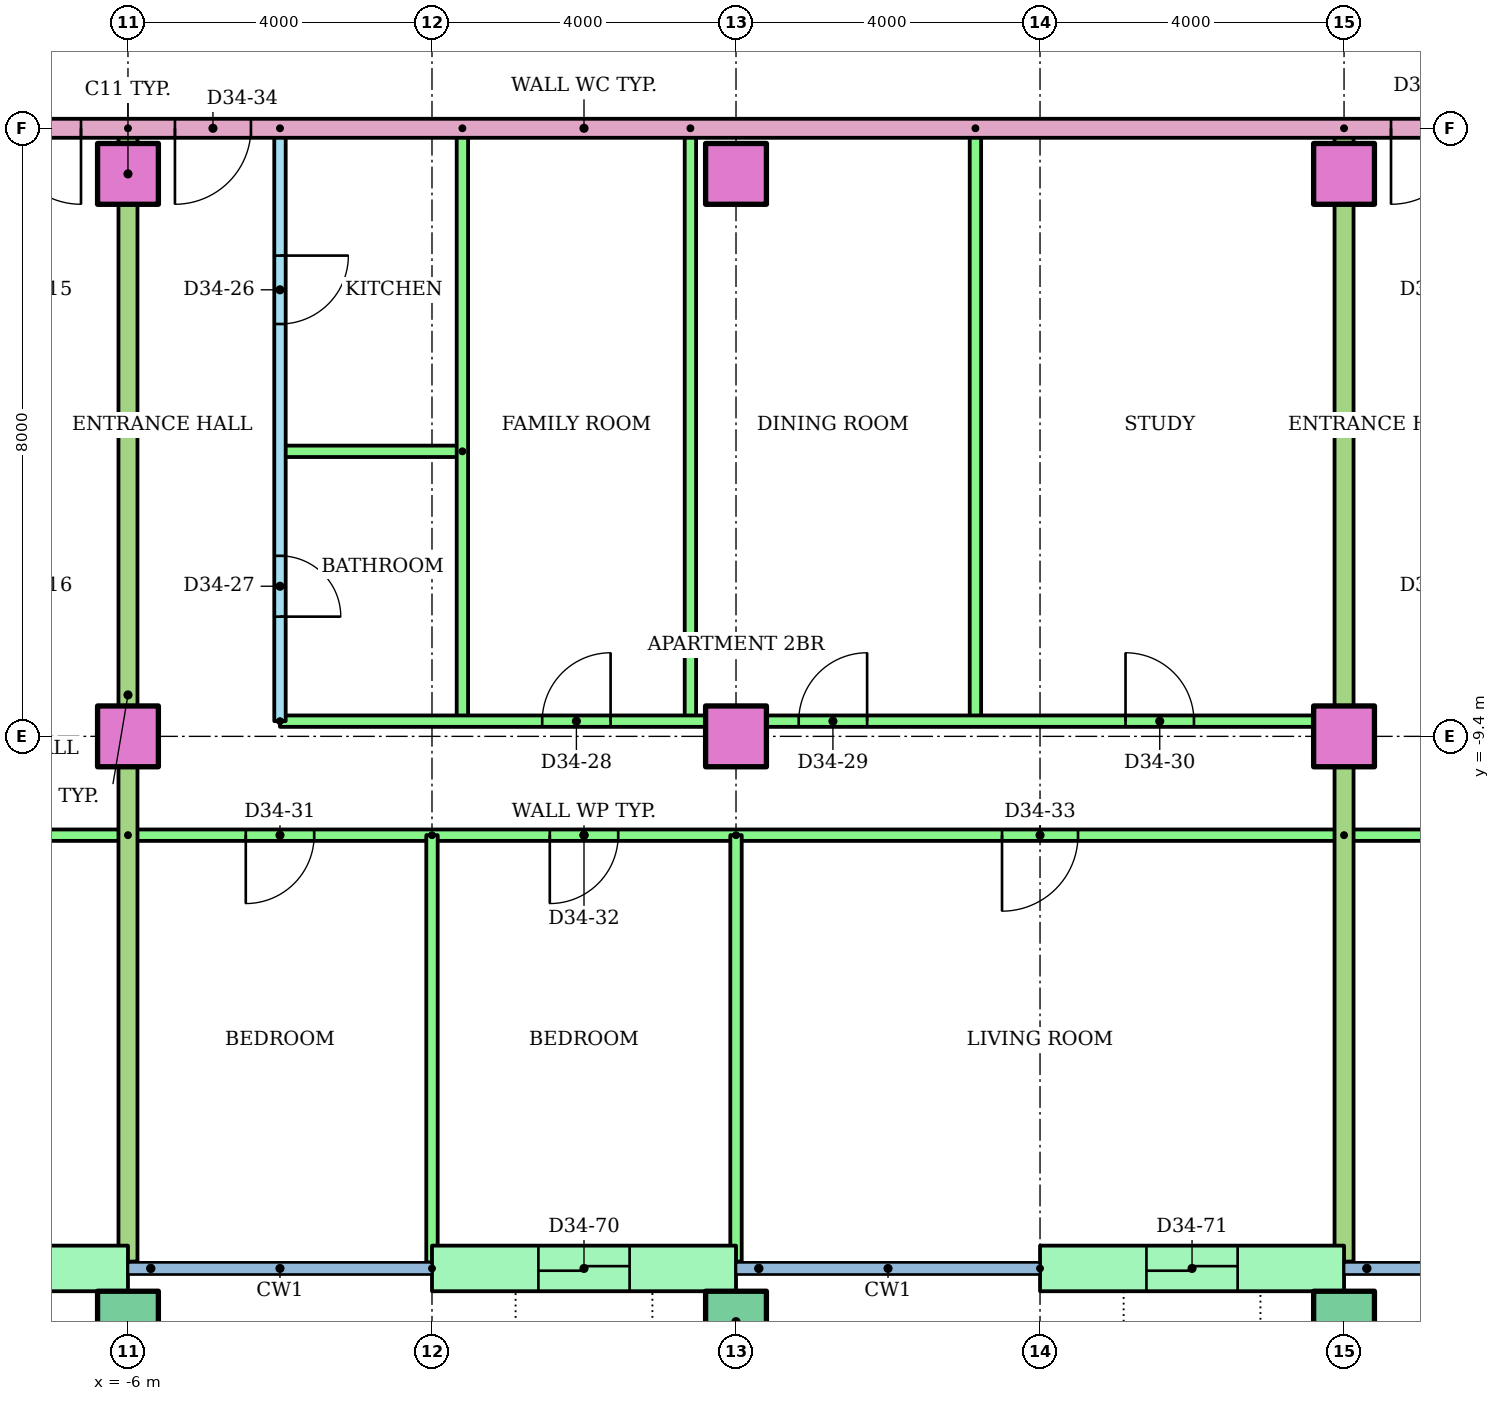
"""IFC4 building model, lengths in metres.
Left out: names, types, materials, properties, quantities, classifications, styles, units other than length and angle.
Written with IfcOpenShell. Run it as: python <this file> out.ifc"""

import sys

from ifc_helpers import new_model, si_unit, direction, frame, frame_2d, origin, origin_2d, place, context, subcontext, project, spatial, rectangle, hollow_rectangle, extrude, element, fill, save


model = new_model("IFC4")
c1 = context("Model", 3, precision=1e-05, world=origin(), true_north=direction((0.0, 1.0)))
c2 = subcontext(c1, "Body", "Model", "MODEL_VIEW")
j1 = project(units=[si_unit("LENGTHUNIT", "METRE"), si_unit("PLANEANGLEUNIT", "RADIAN")], contexts=[c1])
p1 = place(None, origin())
s1 = spatial("IfcSite", under=j1, at=p1, CompositionType="ELEMENT")
p2 = place(p1, origin())
s2 = spatial("IfcBuilding", under=s1, at=p2, CompositionType="ELEMENT")
p3 = place(p2, frame((0.0, 0.0, 132.6)))
s3 = spatial("IfcBuildingStorey", under=s2, at=p3, CompositionType="ELEMENT", Elevation=132.6)
for number, where in (
    (1, (-6.0, -17.1, 0.0)),
    (2, (2.0, -17.1, 0.0)),
    (3, (10.0, -17.1, 0.0)),
):
    element("IfcColumn", number, at=place(p3, frame(where)), inside=s3, PredefinedType="COLUMN", context=c2, shape_type="SweptSolid", body=[
        extrude(hollow_rectangle(XDim=0.8, YDim=0.8, WallThickness=0.04, at=origin_2d()), origin(), (0.0, 0.0, 1.0), 3.2),
    ])
for number, where in (
    (4, (-6.0, -9.4, 0.0)),
    (5, (2.0, -9.4, 0.0)),
    (6, (10.0, -9.4, 0.0)),
    (7, (-6.0, -2.0, 0.0)),
    (8, (2.0, -2.0, 0.0)),
    (9, (10.0, -2.0, 0.0)),
):
    element("IfcColumn", number, at=place(p3, frame(where)), inside=s3, PredefinedType="COLUMN", context=c2, shape_type="SweptSolid", body=[
        extrude(rectangle(XDim=0.8, YDim=0.8, at=origin_2d()), origin(), (0.0, 0.0, 1.0), 3.2),
    ])
p4 = place(p3, frame((-10.0, -16.4, 0.0)))
e10 = element("IfcWall", 10, at=p4, inside=s3, PredefinedType="STANDARD", context=c2, shape_type="SweptSolid", body=[
    extrude(rectangle(XDim=4.0, YDim=0.6, at=frame_2d((2.0, 0.0))), origin(), (0.0, 0.0, 1.0), 2.92),
])
p5 = place(p4, frame((1.4, 0.0, 0.0)))
e11 = element("IfcOpeningElement", 11, at=p5, cuts=e10, PredefinedType="OPENING", context=c2, shape_type="SweptSolid", body=[
    extrude(rectangle(XDim=1.2, YDim=2.1, at=frame_2d((0.6, 1.05))), frame((0.0, 0.31, 0.0), z_axis=(0.0, -1.0, 0.0), x_axis=(1.0, 0.0, 0.0)), (0.0, 0.0, 1.0), 0.62),
])
p6 = place(p3, frame((-2.0, -16.4, 0.0)))
e12 = element("IfcWall", 12, at=p6, inside=s3, PredefinedType="STANDARD", context=c2, shape_type="SweptSolid", body=[
    extrude(rectangle(XDim=4.0, YDim=0.6, at=frame_2d((2.0, 0.0))), origin(), (0.0, 0.0, 1.0), 2.92),
])
p7 = place(p6, frame((1.4, 0.0, 0.0)))
e13 = element("IfcOpeningElement", 13, at=p7, cuts=e12, PredefinedType="OPENING", context=c2, shape_type="SweptSolid", body=[
    extrude(rectangle(XDim=1.2, YDim=2.1, at=frame_2d((0.6, 1.05))), frame((0.0, 0.31, 0.0), z_axis=(0.0, -1.0, 0.0), x_axis=(1.0, 0.0, 0.0)), (0.0, 0.0, 1.0), 0.62),
])
p8 = place(p3, frame((6.0, -16.4, 0.0)))
e14 = element("IfcWall", 14, at=p8, inside=s3, PredefinedType="STANDARD", context=c2, shape_type="SweptSolid", body=[
    extrude(rectangle(XDim=4.0, YDim=0.6, at=frame_2d((2.0, 0.0))), origin(), (0.0, 0.0, 1.0), 2.92),
])
p9 = place(p8, frame((1.4, 0.0, 0.0)))
e15 = element("IfcOpeningElement", 15, at=p9, cuts=e14, PredefinedType="OPENING", context=c2, shape_type="SweptSolid", body=[
    extrude(rectangle(XDim=1.2, YDim=2.1, at=frame_2d((0.6, 1.05))), frame((0.0, 0.31, 0.0), z_axis=(0.0, -1.0, 0.0), x_axis=(1.0, 0.0, 0.0)), (0.0, 0.0, 1.0), 0.62),
])
p10 = place(p3, frame((-6.0, -10.7, 0.0), z_axis=(0.0, 0.0, 1.0), x_axis=(-1.0, 0.0, 0.0)))
e16 = element("IfcWall", 16, at=p10, inside=s3, PredefinedType="PARTITIONING", context=c2, shape_type="SweptSolid", body=[
    extrude(rectangle(XDim=26.72, YDim=0.15, at=frame_2d((13.36, 0.0))), origin(), (0.0, 0.0, 1.0), 2.4),
])
p11 = place(p10, frame((20.75, 0.0, 0.0)))
e17 = element("IfcOpeningElement", 17, at=p11, cuts=e16, PredefinedType="OPENING", context=c2, shape_type="SweptSolid", body=[
    extrude(rectangle(XDim=1.0, YDim=2.1, at=frame_2d((0.5, 1.05))), frame((0.0, 0.085, 0.0), z_axis=(0.0, -1.0, 0.0), x_axis=(1.0, 0.0, 0.0)), (0.0, 0.0, 1.0), 0.17),
])
p12 = place(p10, frame((13.55, 0.0, 0.0)))
e18 = element("IfcOpeningElement", 18, at=p12, cuts=e16, PredefinedType="OPENING", context=c2, shape_type="SweptSolid", body=[
    extrude(rectangle(XDim=0.9, YDim=2.1, at=frame_2d((0.45, 1.05))), frame((0.0, 0.085, 0.0), z_axis=(0.0, -1.0, 0.0), x_axis=(1.0, 0.0, 0.0)), (0.0, 0.0, 1.0), 0.17),
])
p13 = place(p10, frame((9.55, 0.0, 0.0)))
e19 = element("IfcOpeningElement", 19, at=p13, cuts=e16, PredefinedType="OPENING", context=c2, shape_type="SweptSolid", body=[
    extrude(rectangle(XDim=0.9, YDim=2.1, at=frame_2d((0.45, 1.05))), frame((0.0, 0.085, 0.0), z_axis=(0.0, -1.0, 0.0), x_axis=(1.0, 0.0, 0.0)), (0.0, 0.0, 1.0), 0.17),
])
p14 = place(p10, frame((5.55, 0.0, 0.0)))
e20 = element("IfcOpeningElement", 20, at=p14, cuts=e16, PredefinedType="OPENING", context=c2, shape_type="SweptSolid", body=[
    extrude(rectangle(XDim=0.9, YDim=2.1, at=frame_2d((0.45, 1.05))), frame((0.0, 0.085, 0.0), z_axis=(0.0, -1.0, 0.0), x_axis=(1.0, 0.0, 0.0)), (0.0, 0.0, 1.0), 0.17),
])
p15 = place(p10, frame((1.55, 0.0, 0.0)))
e21 = element("IfcOpeningElement", 21, at=p15, cuts=e16, PredefinedType="OPENING", context=c2, shape_type="SweptSolid", body=[
    extrude(rectangle(XDim=0.9, YDim=2.1, at=frame_2d((0.45, 1.05))), frame((0.0, 0.085, 0.0), z_axis=(0.0, -1.0, 0.0), x_axis=(1.0, 0.0, 0.0)), (0.0, 0.0, 1.0), 0.17),
])
p16 = place(p3, frame((-4.0, -1.4, 0.0), z_axis=(0.0, 0.0, 1.0), x_axis=(0.0, -1.0, 0.0)))
e22 = element("IfcWall", 22, at=p16, inside=s3, PredefinedType="PARTITIONING", context=c2, shape_type="SweptSolid", body=[
    extrude(rectangle(XDim=7.8, YDim=0.15, at=frame_2d((3.9, 0.0))), origin(), (0.0, 0.0, 1.0), 2.4),
])
p17 = place(p16, frame((1.675, 0.0, 0.0)))
e23 = element("IfcOpeningElement", 23, at=p17, cuts=e22, PredefinedType="OPENING", context=c2, shape_type="SweptSolid", body=[
    extrude(rectangle(XDim=0.9, YDim=2.1, at=frame_2d((0.45, 1.05))), frame((0.0, 0.085, 0.0), z_axis=(0.0, -1.0, 0.0), x_axis=(1.0, 0.0, 0.0)), (0.0, 0.0, 1.0), 0.17),
])
p18 = place(p16, frame((5.625, 0.0, 0.0)))
e24 = element("IfcOpeningElement", 24, at=p18, cuts=e22, PredefinedType="OPENING", context=c2, shape_type="SweptSolid", body=[
    extrude(rectangle(XDim=0.8, YDim=2.1, at=frame_2d((0.4, 1.05))), frame((0.0, 0.085, 0.0), z_axis=(0.0, -1.0, 0.0), x_axis=(1.0, 0.0, 0.0)), (0.0, 0.0, 1.0), 0.17),
])
p19 = place(p3, frame((-1.6, -5.65, 0.0), z_axis=(0.0, 0.0, 1.0), x_axis=(-1.0, 0.0, 0.0)))
e25 = element("IfcWall", 25, at=p19, inside=s3, PredefinedType="PARTITIONING", context=c2, shape_type="SweptSolid", body=[
    extrude(rectangle(XDim=2.4, YDim=0.15, at=frame_2d((1.2, 0.0))), origin(), (0.0, 0.0, 1.0), 2.4),
])
for number, where, z_axis, x_axis in (
    (26, (-1.6, -1.4, 0.0), (0.0, 0.0, 1.0), (0.0, -1.0, 0.0)),
    (27, (1.4, -1.4, 0.0), (0.0, 0.0, 1.0), (0.0, -1.0, 0.0)),
    (28, (5.15, -1.4, 0.0), (0.0, 0.0, 1.0), (0.0, -1.0, 0.0)),
):
    element("IfcWall", number, at=place(p3, frame(where, z_axis=z_axis, x_axis=x_axis)), inside=s3, PredefinedType="PARTITIONING", context=c2, shape_type="SweptSolid", body=[
        extrude(rectangle(XDim=7.8, YDim=0.15, at=frame_2d((3.9, 0.0))), origin(), (0.0, 0.0, 1.0), 2.4),
    ])
p20 = place(p3, frame((-4.0, -9.2, 0.0)))
e29 = element("IfcWall", 29, at=p20, inside=s3, PredefinedType="PARTITIONING", context=c2, shape_type="SweptSolid", body=[
    extrude(rectangle(XDim=14.0, YDim=0.15, at=frame_2d((7.0, 0.0))), origin(), (0.0, 0.0, 1.0), 2.4),
])
p21 = place(p20, frame((3.45, 0.0, 0.0)))
e30 = element("IfcOpeningElement", 30, at=p21, cuts=e29, PredefinedType="OPENING", context=c2, shape_type="SweptSolid", body=[
    extrude(rectangle(XDim=0.9, YDim=2.1, at=frame_2d((0.45, 1.05))), frame((0.0, 0.085, 0.0), z_axis=(0.0, -1.0, 0.0), x_axis=(1.0, 0.0, 0.0)), (0.0, 0.0, 1.0), 0.17),
])
p22 = place(p20, frame((6.825, 0.0, 0.0)))
e31 = element("IfcOpeningElement", 31, at=p22, cuts=e29, PredefinedType="OPENING", context=c2, shape_type="SweptSolid", body=[
    extrude(rectangle(XDim=0.9, YDim=2.1, at=frame_2d((0.45, 1.05))), frame((0.0, 0.085, 0.0), z_axis=(0.0, -1.0, 0.0), x_axis=(1.0, 0.0, 0.0)), (0.0, 0.0, 1.0), 0.17),
])
p23 = place(p20, frame((11.125, 0.0, 0.0)))
e32 = element("IfcOpeningElement", 32, at=p23, cuts=e29, PredefinedType="OPENING", context=c2, shape_type="SweptSolid", body=[
    extrude(rectangle(XDim=0.9, YDim=2.1, at=frame_2d((0.45, 1.05))), frame((0.0, 0.085, 0.0), z_axis=(0.0, -1.0, 0.0), x_axis=(1.0, 0.0, 0.0)), (0.0, 0.0, 1.0), 0.17),
])
p24 = place(p3, frame((10.0, -10.7, 0.0), z_axis=(0.0, 0.0, 1.0), x_axis=(-1.0, 0.0, 0.0)))
e33 = element("IfcWall", 33, at=p24, inside=s3, PredefinedType="PARTITIONING", context=c2, shape_type="SweptSolid", body=[
    extrude(rectangle(XDim=16.0, YDim=0.15, at=frame_2d((8.0, 0.0))), origin(), (0.0, 0.0, 1.0), 2.4),
])
p25 = place(p24, frame((13.55, 0.0, 0.0)))
e34 = element("IfcOpeningElement", 34, at=p25, cuts=e33, PredefinedType="OPENING", context=c2, shape_type="SweptSolid", body=[
    extrude(rectangle(XDim=0.9, YDim=2.1, at=frame_2d((0.45, 1.05))), frame((0.0, 0.085, 0.0), z_axis=(0.0, -1.0, 0.0), x_axis=(1.0, 0.0, 0.0)), (0.0, 0.0, 1.0), 0.17),
])
p26 = place(p24, frame((9.55, 0.0, 0.0)))
e35 = element("IfcOpeningElement", 35, at=p26, cuts=e33, PredefinedType="OPENING", context=c2, shape_type="SweptSolid", body=[
    extrude(rectangle(XDim=0.9, YDim=2.1, at=frame_2d((0.45, 1.05))), frame((0.0, 0.085, 0.0), z_axis=(0.0, -1.0, 0.0), x_axis=(1.0, 0.0, 0.0)), (0.0, 0.0, 1.0), 0.17),
])
p27 = place(p24, frame((3.5, 0.0, 0.0)))
e36 = element("IfcOpeningElement", 36, at=p27, cuts=e33, PredefinedType="OPENING", context=c2, shape_type="SweptSolid", body=[
    extrude(rectangle(XDim=1.0, YDim=2.1, at=frame_2d((0.5, 1.05))), frame((0.0, 0.085, 0.0), z_axis=(0.0, -1.0, 0.0), x_axis=(1.0, 0.0, 0.0)), (0.0, 0.0, 1.0), 0.17),
])
p28 = place(p3, frame((-2.0, -10.7, 0.0), z_axis=(0.0, 0.0, 1.0), x_axis=(0.0, -1.0, 0.0)))
e37 = element("IfcWall", 37, at=p28, inside=s3, PredefinedType="PARTITIONING", context=c2, shape_type="SweptSolid", body=[
    extrude(rectangle(XDim=5.621, YDim=0.15, at=frame_2d((2.811, 0.0))), origin(), (0.0, 0.0, 1.0), 2.4),
])
p29 = place(p3, frame((2.0, -10.7, 0.0), z_axis=(0.0, 0.0, 1.0), x_axis=(0.0, -1.0, 0.0)))
e38 = element("IfcWall", 38, at=p29, inside=s3, PredefinedType="PARTITIONING", context=c2, shape_type="SweptSolid", body=[
    extrude(rectangle(XDim=5.61, YDim=0.15, at=frame_2d((2.805, 0.0))), origin(), (0.0, 0.0, 1.0), 2.4),
])
p30 = place(p3, frame((-6.0, -1.4, 0.0), z_axis=(0.0, 0.0, 1.0), x_axis=(0.0, -1.0, 0.0)))
e39 = element("IfcWall", 39, at=p30, inside=s3, PredefinedType="PARTITIONING", context=c2, shape_type="SweptSolid", body=[
    extrude(rectangle(XDim=14.91, YDim=0.25, at=frame_2d((7.455, 0.0))), origin(), (0.0, 0.0, 1.0), 2.4),
])
p31 = place(p3, frame((32.72, -10.7, 0.0), z_axis=(0.0, 0.0, 1.0), x_axis=(-1.0, 0.0, 0.0)))
e40 = element("IfcWall", 40, at=p31, inside=s3, PredefinedType="PARTITIONING", context=c2, shape_type="SweptSolid", body=[
    extrude(rectangle(XDim=22.72, YDim=0.15, at=frame_2d((11.36, 0.0))), origin(), (0.0, 0.0, 1.0), 2.4),
])
p32 = place(p31, frame((20.27, 0.0, 0.0)))
e41 = element("IfcOpeningElement", 41, at=p32, cuts=e40, PredefinedType="OPENING", context=c2, shape_type="SweptSolid", body=[
    extrude(rectangle(XDim=0.9, YDim=2.1, at=frame_2d((0.45, 1.05))), frame((0.0, 0.085, 0.0), z_axis=(0.0, -1.0, 0.0), x_axis=(1.0, 0.0, 0.0)), (0.0, 0.0, 1.0), 0.17),
])
p33 = place(p31, frame((16.27, 0.0, 0.0)))
e42 = element("IfcOpeningElement", 42, at=p33, cuts=e40, PredefinedType="OPENING", context=c2, shape_type="SweptSolid", body=[
    extrude(rectangle(XDim=0.9, YDim=2.1, at=frame_2d((0.45, 1.05))), frame((0.0, 0.085, 0.0), z_axis=(0.0, -1.0, 0.0), x_axis=(1.0, 0.0, 0.0)), (0.0, 0.0, 1.0), 0.17),
])
p34 = place(p31, frame((10.22, 0.0, 0.0)))
e43 = element("IfcOpeningElement", 43, at=p34, cuts=e40, PredefinedType="OPENING", context=c2, shape_type="SweptSolid", body=[
    extrude(rectangle(XDim=1.0, YDim=2.1, at=frame_2d((0.5, 1.05))), frame((0.0, 0.085, 0.0), z_axis=(0.0, -1.0, 0.0), x_axis=(1.0, 0.0, 0.0)), (0.0, 0.0, 1.0), 0.17),
])
p35 = place(p31, frame((3.02, 0.0, 0.0)))
e44 = element("IfcOpeningElement", 44, at=p35, cuts=e40, PredefinedType="OPENING", context=c2, shape_type="SweptSolid", body=[
    extrude(rectangle(XDim=0.9, YDim=2.1, at=frame_2d((0.45, 1.05))), frame((0.0, 0.085, 0.0), z_axis=(0.0, -1.0, 0.0), x_axis=(1.0, 0.0, 0.0)), (0.0, 0.0, 1.0), 0.17),
])
p36 = place(p3, frame((10.0, -1.4, 0.0), z_axis=(0.0, 0.0, 1.0), x_axis=(0.0, -1.0, 0.0)))
e45 = element("IfcWall", 45, at=p36, inside=s3, PredefinedType="PARTITIONING", context=c2, shape_type="SweptSolid", body=[
    extrude(rectangle(XDim=14.91, YDim=0.25, at=frame_2d((7.455, 0.0))), origin(), (0.0, 0.0, 1.0), 2.4),
])
p37 = place(p3, frame((14.0, -1.4, 0.0), z_axis=(0.0, 0.0, 1.0), x_axis=(-1.0, 0.0, 0.0)))
e46 = element("IfcWall", 46, at=p37, inside=s3, PredefinedType="PARTITIONING", context=c2, shape_type="SweptSolid", body=[
    extrude(rectangle(XDim=28.0, YDim=0.25, at=frame_2d((14.0, 0.0))), origin(), (0.0, 0.0, 1.0), 2.4),
])
p38 = place(p37, frame((20.618, 0.0, 0.0)))
e47 = element("IfcOpeningElement", 47, at=p38, cuts=e46, PredefinedType="OPENING", context=c2, shape_type="SweptSolid", body=[
    extrude(rectangle(XDim=1.0, YDim=2.1, at=frame_2d((0.5, 1.05))), frame((0.0, 0.135, 0.0), z_axis=(0.0, -1.0, 0.0), x_axis=(1.0, 0.0, 0.0)), (0.0, 0.0, 1.0), 0.27),
])
p39 = place(p37, frame((18.382, 0.0, 0.0)))
e48 = element("IfcOpeningElement", 48, at=p39, cuts=e46, PredefinedType="OPENING", context=c2, shape_type="SweptSolid", body=[
    extrude(rectangle(XDim=1.0, YDim=2.1, at=frame_2d((0.5, 1.05))), frame((0.0, 0.135, 0.0), z_axis=(0.0, -1.0, 0.0), x_axis=(1.0, 0.0, 0.0)), (0.0, 0.0, 1.0), 0.27),
])
p40 = place(p37, frame((2.382, 0.0, 0.0)))
e49 = element("IfcOpeningElement", 49, at=p40, cuts=e46, PredefinedType="OPENING", context=c2, shape_type="SweptSolid", body=[
    extrude(rectangle(XDim=1.0, YDim=2.1, at=frame_2d((0.5, 1.05))), frame((0.0, 0.135, 0.0), z_axis=(0.0, -1.0, 0.0), x_axis=(1.0, 0.0, 0.0)), (0.0, 0.0, 1.0), 0.27),
])
p41 = place(p38, origin())
e50 = element("IfcDoor", 50, at=p41, inside=s3, OperationType="SINGLE_SWING_LEFT", PredefinedType="DOOR", context=c2, shape_type="SweptSolid", body=[
    extrude(rectangle(XDim=1.0, YDim=2.1, at=frame_2d((0.5, 1.05))), frame((0.0, 0.025, 0.0), z_axis=(0.0, -1.0, 0.0), x_axis=(1.0, 0.0, 0.0)), (0.0, 0.0, 1.0), 0.05),
])
fill(e47, e50)
p42 = place(p17, origin())
e51 = element("IfcDoor", 51, at=p42, inside=s3, OperationType="SINGLE_SWING_LEFT", PredefinedType="DOOR", context=c2, shape_type="SweptSolid", body=[
    extrude(rectangle(XDim=0.9, YDim=2.1, at=frame_2d((0.45, 1.05))), frame((0.0, 0.025, 0.0), z_axis=(0.0, -1.0, 0.0), x_axis=(1.0, 0.0, 0.0)), (0.0, 0.0, 1.0), 0.05),
])
fill(e23, e51)
p43 = place(p18, origin())
e52 = element("IfcDoor", 52, at=p43, inside=s3, OperationType="SINGLE_SWING_RIGHT", PredefinedType="DOOR", context=c2, shape_type="SweptSolid", body=[
    extrude(rectangle(XDim=0.8, YDim=2.1, at=frame_2d((0.4, 1.05))), frame((0.0, 0.025, 0.0), z_axis=(0.0, -1.0, 0.0), x_axis=(1.0, 0.0, 0.0)), (0.0, 0.0, 1.0), 0.05),
])
fill(e24, e52)
p44 = place(p21, origin())
e53 = element("IfcDoor", 53, at=p44, inside=s3, OperationType="SINGLE_SWING_RIGHT", PredefinedType="DOOR", context=c2, shape_type="SweptSolid", body=[
    extrude(rectangle(XDim=0.9, YDim=2.1, at=frame_2d((0.45, 1.05))), frame((0.0, 0.025, 0.0), z_axis=(0.0, -1.0, 0.0), x_axis=(1.0, 0.0, 0.0)), (0.0, 0.0, 1.0), 0.05),
])
fill(e30, e53)
p45 = place(p22, origin())
e54 = element("IfcDoor", 54, at=p45, inside=s3, OperationType="SINGLE_SWING_RIGHT", PredefinedType="DOOR", context=c2, shape_type="SweptSolid", body=[
    extrude(rectangle(XDim=0.9, YDim=2.1, at=frame_2d((0.45, 1.05))), frame((0.0, 0.025, 0.0), z_axis=(0.0, -1.0, 0.0), x_axis=(1.0, 0.0, 0.0)), (0.0, 0.0, 1.0), 0.05),
])
fill(e31, e54)
p46 = place(p23, origin())
e55 = element("IfcDoor", 55, at=p46, inside=s3, OperationType="SINGLE_SWING_LEFT", PredefinedType="DOOR", context=c2, shape_type="SweptSolid", body=[
    extrude(rectangle(XDim=0.9, YDim=2.1, at=frame_2d((0.45, 1.05))), frame((0.0, 0.025, 0.0), z_axis=(0.0, -1.0, 0.0), x_axis=(1.0, 0.0, 0.0)), (0.0, 0.0, 1.0), 0.05),
])
fill(e32, e55)
p47 = place(p25, origin())
e56 = element("IfcDoor", 56, at=p47, inside=s3, OperationType="SINGLE_SWING_RIGHT", PredefinedType="DOOR", context=c2, shape_type="SweptSolid", body=[
    extrude(rectangle(XDim=0.9, YDim=2.1, at=frame_2d((0.45, 1.05))), frame((0.0, 0.025, 0.0), z_axis=(0.0, -1.0, 0.0), x_axis=(1.0, 0.0, 0.0)), (0.0, 0.0, 1.0), 0.05),
])
fill(e34, e56)
p48 = place(p26, origin())
e57 = element("IfcDoor", 57, at=p48, inside=s3, OperationType="SINGLE_SWING_RIGHT", PredefinedType="DOOR", context=c2, shape_type="SweptSolid", body=[
    extrude(rectangle(XDim=0.9, YDim=2.1, at=frame_2d((0.45, 1.05))), frame((0.0, 0.025, 0.0), z_axis=(0.0, -1.0, 0.0), x_axis=(1.0, 0.0, 0.0)), (0.0, 0.0, 1.0), 0.05),
])
fill(e35, e57)
p49 = place(p27, origin())
e58 = element("IfcDoor", 58, at=p49, inside=s3, OperationType="SINGLE_SWING_RIGHT", PredefinedType="DOOR", context=c2, shape_type="SweptSolid", body=[
    extrude(rectangle(XDim=1.0, YDim=2.1, at=frame_2d((0.5, 1.05))), frame((0.0, 0.025, 0.0), z_axis=(0.0, -1.0, 0.0), x_axis=(1.0, 0.0, 0.0)), (0.0, 0.0, 1.0), 0.05),
])
fill(e36, e58)
p50 = place(p39, origin())
e59 = element("IfcDoor", 59, at=p50, inside=s3, OperationType="SINGLE_SWING_RIGHT", PredefinedType="DOOR", context=c2, shape_type="SweptSolid", body=[
    extrude(rectangle(XDim=1.0, YDim=2.1, at=frame_2d((0.5, 1.05))), frame((0.0, 0.025, 0.0), z_axis=(0.0, -1.0, 0.0), x_axis=(1.0, 0.0, 0.0)), (0.0, 0.0, 1.0), 0.05),
])
fill(e48, e59)
p51 = place(p40, origin())
e60 = element("IfcDoor", 60, at=p51, inside=s3, OperationType="SINGLE_SWING_RIGHT", PredefinedType="DOOR", context=c2, shape_type="SweptSolid", body=[
    extrude(rectangle(XDim=1.0, YDim=2.1, at=frame_2d((0.5, 1.05))), frame((0.0, 0.025, 0.0), z_axis=(0.0, -1.0, 0.0), x_axis=(1.0, 0.0, 0.0)), (0.0, 0.0, 1.0), 0.05),
])
fill(e49, e60)
p52 = place(p7, origin())
e61 = element("IfcDoor", 61, at=p52, inside=s3, OperationType="SLIDING_TO_LEFT", PredefinedType="DOOR", context=c2, shape_type="SweptSolid", body=[
    extrude(rectangle(XDim=1.2, YDim=2.1, at=frame_2d((0.6, 1.05))), frame((0.0, 0.025, 0.0), z_axis=(0.0, -1.0, 0.0), x_axis=(1.0, 0.0, 0.0)), (0.0, 0.0, 1.0), 0.05),
])
fill(e13, e61)
p53 = place(p9, origin())
e62 = element("IfcDoor", 62, at=p53, inside=s3, OperationType="SLIDING_TO_LEFT", PredefinedType="DOOR", context=c2, shape_type="SweptSolid", body=[
    extrude(rectangle(XDim=1.2, YDim=2.1, at=frame_2d((0.6, 1.05))), frame((0.0, 0.025, 0.0), z_axis=(0.0, -1.0, 0.0), x_axis=(1.0, 0.0, 0.0)), (0.0, 0.0, 1.0), 0.05),
])
fill(e15, e62)
save(model, sys.argv[1])
